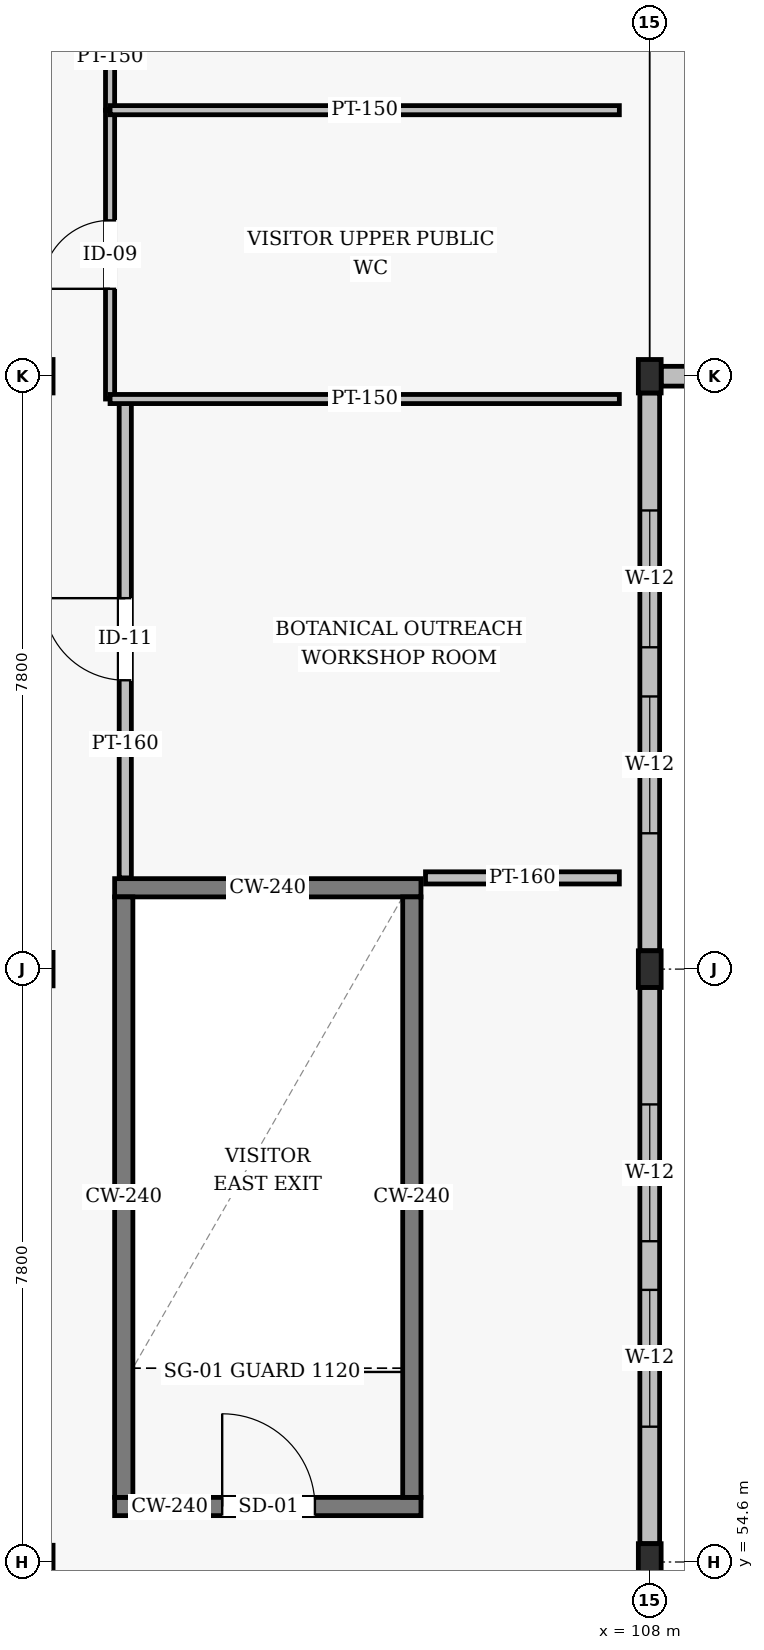
"""IFC4 building model, lengths in metres.
Left out: names, types, materials, properties, quantities, classifications, styles, units other than length and angle.
Written with IfcOpenShell. Run it as: python <this file> out.ifc"""

import sys

from ifc_helpers import new_model, si_unit, direction, frame, frame_2d, origin, origin_2d, place, context, subcontext, project, spatial, rectangle, i_section, extrude, element, fill, save


model = new_model("IFC4")
c1 = context("Model", 3, precision=1e-05, world=origin(), true_north=direction((0.0, 1.0)))
c2 = subcontext(c1, "Body", "Model", "MODEL_VIEW")
j1 = project(units=[si_unit("LENGTHUNIT", "METRE"), si_unit("PLANEANGLEUNIT", "RADIAN")], contexts=[c1])
p1 = place(None, origin())
s1 = spatial("IfcSite", under=j1, at=p1, CompositionType="ELEMENT")
p2 = place(p1, origin())
s2 = spatial("IfcBuilding", under=s1, at=p2, CompositionType="ELEMENT")
p3 = place(p2, frame((0.0, 0.0, 9.0)))
s3 = spatial("IfcBuildingStorey", under=s2, at=p3, CompositionType="ELEMENT", Elevation=9.0)
for number, where, z_axis, x_axis in (
    (1, (100.0, 54.6, 0.0), (0.0, 0.0, 1.0), (1.0, 0.0, 0.0)),
    (2, (100.0, 62.4, 0.0), (0.0, 0.0, 1.0), (1.0, 0.0, 0.0)),
    (3, (100.0, 70.2, 0.0), (0.0, 0.0, 1.0), (1.0, 0.0, 0.0)),
):
    element("IfcColumn", number, at=place(p3, frame(where, z_axis=z_axis, x_axis=x_axis)), inside=s3, PredefinedType="COLUMN", context=c2, shape_type="SweptSolid", body=[
        extrude(i_section(OverallWidth=0.3, OverallDepth=0.44, WebThickness=0.011, FlangeThickness=0.018, FilletRadius=0.024, at=origin_2d()), origin(), (0.0, 0.0, 1.0), 4.2),
    ])
for number, where, z_axis, x_axis in (
    (4, (108.0, 54.6, 0.0), (0.0, 0.0, 1.0), (1.0, 0.0, 0.0)),
    (5, (108.0, 62.4, 0.0), (0.0, 0.0, 1.0), (1.0, 0.0, 0.0)),
):
    element("IfcColumn", number, at=place(p3, frame(where, z_axis=z_axis, x_axis=x_axis)), inside=s3, PredefinedType="COLUMN", context=c2, shape_type="SweptSolid", body=[
        extrude(i_section(OverallWidth=0.3, OverallDepth=0.482, WebThickness=0.011, FlangeThickness=0.015, FilletRadius=0.024, at=origin_2d()), origin(), (0.0, 0.0, 1.0), 4.2),
    ])
p4 = place(p3, frame((108.0, 70.2, 0.0), z_axis=(0.0, 0.0, 1.0), x_axis=(1.0, 0.0, 0.0)))
e6 = element("IfcColumn", 6, at=p4, inside=s3, PredefinedType="COLUMN", context=c2, shape_type="SweptSolid", body=[
    extrude(i_section(OverallWidth=0.3, OverallDepth=0.44, WebThickness=0.011, FlangeThickness=0.018, FilletRadius=0.024, at=origin_2d()), origin(), (0.0, 0.0, 1.0), 4.2),
])
p5 = place(p3, frame((108.0, 54.841, 0.0), z_axis=(0.0, 0.0, 1.0), x_axis=(0.0, 1.0, 0.0)))
e7 = element("IfcWall", 7, at=p5, inside=s3, PredefinedType="SOLIDWALL", context=c2, shape_type="SweptSolid", body=[
    extrude(rectangle(XDim=7.318, YDim=0.26, at=frame_2d((3.659, 0.0))), origin(), (0.0, 0.0, 1.0), 3.386),
])
p6 = place(p5, frame((1.539, 0.0, 0.75)))
e8 = element("IfcOpeningElement", 8, at=p6, cuts=e7, PredefinedType="OPENING", context=c2, shape_type="SweptSolid", body=[
    extrude(rectangle(XDim=1.8, YDim=2.34, at=frame_2d((0.9, 1.17))), frame((0.0, 0.14, 0.0), z_axis=(0.0, -1.0, 0.0), x_axis=(1.0, 0.0, 0.0)), (0.0, 0.0, 1.0), 0.28),
])
p7 = place(p5, frame((3.979, 0.0, 0.75)))
e9 = element("IfcOpeningElement", 9, at=p7, cuts=e7, PredefinedType="OPENING", context=c2, shape_type="SweptSolid", body=[
    extrude(rectangle(XDim=1.8, YDim=2.34, at=frame_2d((0.9, 1.17))), frame((0.0, 0.14, 0.0), z_axis=(0.0, -1.0, 0.0), x_axis=(1.0, 0.0, 0.0)), (0.0, 0.0, 1.0), 0.28),
])
p8 = place(p3, frame((108.0, 62.641, 0.0), z_axis=(0.0, 0.0, 1.0), x_axis=(0.0, 1.0, 0.0)))
e10 = element("IfcWall", 10, at=p8, inside=s3, PredefinedType="SOLIDWALL", context=c2, shape_type="SweptSolid", body=[
    extrude(rectangle(XDim=7.339, YDim=0.26, at=frame_2d((3.669, 0.0))), origin(), (0.0, 0.0, 1.0), 3.386),
])
p9 = place(p8, frame((1.546, 0.0, 0.75)))
e11 = element("IfcOpeningElement", 11, at=p9, cuts=e10, PredefinedType="OPENING", context=c2, shape_type="SweptSolid", body=[
    extrude(rectangle(XDim=1.8, YDim=2.34, at=frame_2d((0.9, 1.17))), frame((0.0, 0.14, 0.0), z_axis=(0.0, -1.0, 0.0), x_axis=(1.0, 0.0, 0.0)), (0.0, 0.0, 1.0), 0.28),
])
p10 = place(p8, frame((3.993, 0.0, 0.75)))
e12 = element("IfcOpeningElement", 12, at=p10, cuts=e10, PredefinedType="OPENING", context=c2, shape_type="SweptSolid", body=[
    extrude(rectangle(XDim=1.8, YDim=2.34, at=frame_2d((0.9, 1.17))), frame((0.0, 0.14, 0.0), z_axis=(0.0, -1.0, 0.0), x_axis=(1.0, 0.0, 0.0)), (0.0, 0.0, 1.0), 0.28),
])
p11 = place(p3, frame((108.15, 70.2, 0.0), z_axis=(0.0, 0.0, 1.0), x_axis=(1.0, 0.0, 0.0)))
e13 = element("IfcWall", 13, at=p11, inside=s3, PredefinedType="SOLIDWALL", context=c2, shape_type="SweptSolid", body=[
    extrude(rectangle(XDim=8.25, YDim=0.26, at=frame_2d((4.125, 0.0))), origin(), (0.0, 0.0, 1.0), 3.935),
])
p12 = place(p11, frame((1.75, 0.0, 0.78)))
e14 = element("IfcOpeningElement", 14, at=p12, cuts=e13, PredefinedType="OPENING", context=c2, shape_type="SweptSolid", body=[
    extrude(rectangle(XDim=2.0, YDim=2.35, at=frame_2d((1.0, 1.175))), frame((0.0, 0.14, 0.0), z_axis=(0.0, -1.0, 0.0), x_axis=(1.0, 0.0, 0.0)), (0.0, 0.0, 1.0), 0.28),
])
p13 = place(p11, frame((4.5, 0.0, 0.78)))
e15 = element("IfcOpeningElement", 15, at=p13, cuts=e13, PredefinedType="OPENING", context=c2, shape_type="SweptSolid", body=[
    extrude(rectangle(XDim=2.0, YDim=2.35, at=frame_2d((1.0, 1.175))), frame((0.0, 0.14, 0.0), z_axis=(0.0, -1.0, 0.0), x_axis=(1.0, 0.0, 0.0)), (0.0, 0.0, 1.0), 0.28),
])
p14 = place(p3, frame((100.96, 55.33, 0.0), z_axis=(0.0, 0.0, 1.0), x_axis=(1.0, 0.0, 0.0)))
e16 = element("IfcWall", 16, at=p14, inside=s3, PredefinedType="SHEAR", context=c2, shape_type="SweptSolid", body=[
    extrude(rectangle(XDim=4.03, YDim=0.24, at=frame_2d((2.015, 0.0))), origin(), (0.0, 0.0, 1.0), 3.935),
])
p15 = place(p14, frame((1.415, 0.0, 0.0)))
e17 = element("IfcOpeningElement", 17, at=p15, cuts=e16, PredefinedType="OPENING", context=c2, shape_type="SweptSolid", body=[
    extrude(rectangle(XDim=1.22, YDim=2.18, at=frame_2d((0.61, 1.09))), frame((0.0, 0.13, 0.0), z_axis=(0.0, -1.0, 0.0), x_axis=(1.0, 0.0, 0.0)), (0.0, 0.0, 1.0), 0.26),
])
p16 = place(p3, frame((100.96, 63.47, 0.0), z_axis=(0.0, 0.0, 1.0), x_axis=(1.0, 0.0, 0.0)))
e18 = element("IfcWall", 18, at=p16, inside=s3, PredefinedType="SHEAR", context=c2, shape_type="SweptSolid", body=[
    extrude(rectangle(XDim=4.03, YDim=0.24, at=frame_2d((2.015, 0.0))), origin(), (0.0, 0.0, 1.0), 3.935),
])
for number, where, z_axis, x_axis in (
    (19, (101.08, 55.45, 0.0), (0.0, 0.0, 1.0), (0.0, 1.0, 0.0)),
    (20, (104.87, 55.45, 0.0), (0.0, 0.0, 1.0), (0.0, 1.0, 0.0)),
):
    element("IfcWall", number, at=place(p3, frame(where, z_axis=z_axis, x_axis=x_axis)), inside=s3, PredefinedType="SHEAR", context=c2, shape_type="SweptSolid", body=[
        extrude(rectangle(XDim=7.9, YDim=0.24, at=frame_2d((3.95, 0.0))), origin(), (0.0, 0.0, 1.0), 3.935),
    ])
p17 = place(p3, frame((101.1, 63.6, 0.0), z_axis=(0.0, 0.0, 1.0), x_axis=(0.0, 1.0, 0.0)))
e21 = element("IfcWall", 21, at=p17, inside=s3, PredefinedType="PARTITIONING", context=c2, shape_type="SweptSolid", body=[
    extrude(rectangle(XDim=6.3, YDim=0.16, at=frame_2d((3.15, 0.0))), origin(), (0.0, 0.0, 1.0), 3.586),
])
p18 = place(p17, frame((2.6, 0.0, 0.0)))
e22 = element("IfcOpeningElement", 22, at=p18, cuts=e21, PredefinedType="OPENING", context=c2, shape_type="SweptSolid", body=[
    extrude(rectangle(XDim=1.08, YDim=2.08, at=frame_2d((0.54, 1.04))), frame((0.0, 0.09, 0.0), z_axis=(0.0, -1.0, 0.0), x_axis=(1.0, 0.0, 0.0)), (0.0, 0.0, 1.0), 0.18),
])
p19 = place(p3, frame((105.05, 63.6, 0.0), z_axis=(0.0, 0.0, 1.0), x_axis=(1.0, 0.0, 0.0)))
e23 = element("IfcWall", 23, at=p19, inside=s3, PredefinedType="PARTITIONING", context=c2, shape_type="SweptSolid", body=[
    extrude(rectangle(XDim=2.55, YDim=0.16, at=frame_2d((1.275, 0.0))), origin(), (0.0, 0.0, 1.0), 3.935),
])
p20 = place(p3, frame((100.9, 69.9, 0.0), z_axis=(0.0, 0.0, 1.0), x_axis=(0.0, 1.0, 0.0)))
e24 = element("IfcWall", 24, at=p20, inside=s3, PredefinedType="PARTITIONING", context=c2, shape_type="SweptSolid", body=[
    extrude(rectangle(XDim=3.8, YDim=0.12, at=frame_2d((1.9, 0.0))), origin(), (0.0, 0.0, 1.0), 3.33),
])
p21 = place(p20, frame((1.45, 0.0, 0.0)))
e25 = element("IfcOpeningElement", 25, at=p21, cuts=e24, PredefinedType="OPENING", context=c2, shape_type="SweptSolid", body=[
    extrude(rectangle(XDim=0.9, YDim=2.1, at=frame_2d((0.45, 1.05))), frame((0.0, 0.07, 0.0), z_axis=(0.0, -1.0, 0.0), x_axis=(1.0, 0.0, 0.0)), (0.0, 0.0, 1.0), 0.14),
])
p22 = place(p3, frame((100.9, 73.7, 0.0), z_axis=(0.0, 0.0, 1.0), x_axis=(0.0, 1.0, 0.0)))
e26 = element("IfcWall", 26, at=p22, inside=s3, PredefinedType="PARTITIONING", context=c2, shape_type="SweptSolid", body=[
    extrude(rectangle(XDim=3.9, YDim=0.12, at=frame_2d((1.95, 0.0))), origin(), (0.0, 0.0, 1.0), 3.586),
])
p23 = place(p22, frame((1.45, 0.0, 0.0)))
e27 = element("IfcOpeningElement", 27, at=p23, cuts=e26, PredefinedType="OPENING", context=c2, shape_type="SweptSolid", body=[
    extrude(rectangle(XDim=1.0, YDim=2.1, at=frame_2d((0.5, 1.05))), frame((0.0, 0.07, 0.0), z_axis=(0.0, -1.0, 0.0), x_axis=(1.0, 0.0, 0.0)), (0.0, 0.0, 1.0), 0.14),
])
for number, where, z_axis, x_axis in (
    (28, (100.9, 69.9, 0.0), (0.0, 0.0, 1.0), (1.0, 0.0, 0.0)),
    (29, (100.9, 73.7, 0.0), (0.0, 0.0, 1.0), (1.0, 0.0, 0.0)),
):
    element("IfcWall", number, at=place(p3, frame(where, z_axis=z_axis, x_axis=x_axis)), inside=s3, PredefinedType="PARTITIONING", context=c2, shape_type="SweptSolid", body=[
        extrude(rectangle(XDim=6.7, YDim=0.12, at=frame_2d((3.35, 0.0))), origin(), (0.0, 0.0, 1.0), 3.935),
    ])
p24 = place(p6, origin())
e30 = element("IfcWindow", 30, at=p24, inside=s3, PartitioningType="SINGLE_PANEL", PredefinedType="WINDOW", context=c2, shape_type="SweptSolid", body=[
    extrude(rectangle(XDim=1.8, YDim=2.34, at=frame_2d((0.9, 1.17))), frame((0.0, 0.03, 0.0), z_axis=(0.0, -1.0, 0.0), x_axis=(1.0, 0.0, 0.0)), (0.0, 0.0, 1.0), 0.06),
])
fill(e8, e30)
p25 = place(p7, origin())
e31 = element("IfcWindow", 31, at=p25, inside=s3, PartitioningType="SINGLE_PANEL", PredefinedType="WINDOW", context=c2, shape_type="SweptSolid", body=[
    extrude(rectangle(XDim=1.8, YDim=2.34, at=frame_2d((0.9, 1.17))), frame((0.0, 0.03, 0.0), z_axis=(0.0, -1.0, 0.0), x_axis=(1.0, 0.0, 0.0)), (0.0, 0.0, 1.0), 0.06),
])
fill(e9, e31)
p26 = place(p9, origin())
e32 = element("IfcWindow", 32, at=p26, inside=s3, PartitioningType="SINGLE_PANEL", PredefinedType="WINDOW", context=c2, shape_type="SweptSolid", body=[
    extrude(rectangle(XDim=1.8, YDim=2.34, at=frame_2d((0.9, 1.17))), frame((0.0, 0.03, 0.0), z_axis=(0.0, -1.0, 0.0), x_axis=(1.0, 0.0, 0.0)), (0.0, 0.0, 1.0), 0.06),
])
fill(e11, e32)
p27 = place(p10, origin())
e33 = element("IfcWindow", 33, at=p27, inside=s3, PartitioningType="SINGLE_PANEL", PredefinedType="WINDOW", context=c2, shape_type="SweptSolid", body=[
    extrude(rectangle(XDim=1.8, YDim=2.34, at=frame_2d((0.9, 1.17))), frame((0.0, 0.03, 0.0), z_axis=(0.0, -1.0, 0.0), x_axis=(1.0, 0.0, 0.0)), (0.0, 0.0, 1.0), 0.06),
])
fill(e12, e33)
p28 = place(p15, origin())
e34 = element("IfcDoor", 34, at=p28, inside=s3, OperationType="SINGLE_SWING_LEFT", PredefinedType="DOOR", context=c2, shape_type="SweptSolid", body=[
    extrude(rectangle(XDim=1.22, YDim=2.18, at=frame_2d((0.61, 1.09))), frame((0.0, 0.025, 0.0), z_axis=(0.0, -1.0, 0.0), x_axis=(1.0, 0.0, 0.0)), (0.0, 0.0, 1.0), 0.05),
])
fill(e17, e34)
p29 = place(p18, origin())
e35 = element("IfcDoor", 35, at=p29, inside=s3, OperationType="SINGLE_SWING_RIGHT", PredefinedType="DOOR", context=c2, shape_type="SweptSolid", body=[
    extrude(rectangle(XDim=1.08, YDim=2.08, at=frame_2d((0.54, 1.04))), frame((0.0, 0.025, 0.0), z_axis=(0.0, -1.0, 0.0), x_axis=(1.0, 0.0, 0.0)), (0.0, 0.0, 1.0), 0.05),
])
fill(e22, e35)
p30 = place(p21, origin())
e36 = element("IfcDoor", 36, at=p30, inside=s3, OperationType="SINGLE_SWING_LEFT", PredefinedType="DOOR", context=c2, shape_type="SweptSolid", body=[
    extrude(rectangle(XDim=0.9, YDim=2.1, at=frame_2d((0.45, 1.05))), frame((0.0, 0.025, 0.0), z_axis=(0.0, -1.0, 0.0), x_axis=(1.0, 0.0, 0.0)), (0.0, 0.0, 1.0), 0.05),
])
fill(e25, e36)
save(model, sys.argv[1])
